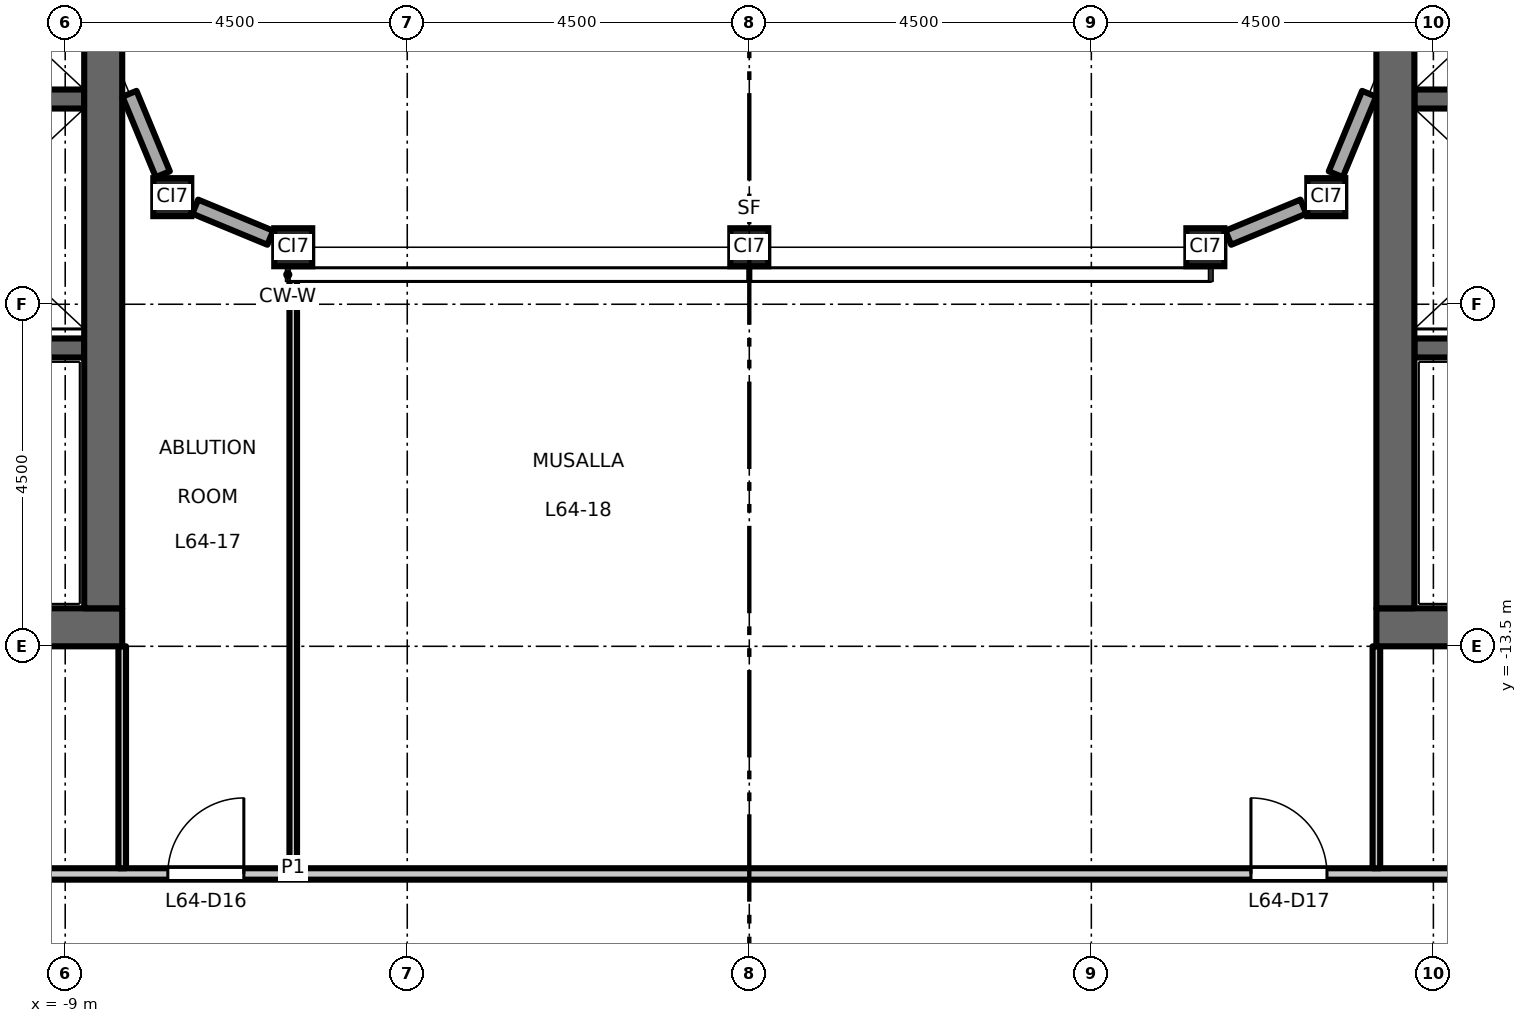
"""IFC4 building model, lengths in metres.
Left out: names, types, materials, properties, quantities, classifications, styles, units other than length and angle.
Written with IfcOpenShell. Run it as: python <this file> out.ifc"""

import sys

from ifc_helpers import new_model, si_unit, direction, frame, frame_2d, origin, origin_2d, place, context, subcontext, project, spatial, rectangle, hollow_rectangle, extrude, element, fill, save


model = new_model("IFC4")
c1 = context("Model", 3, precision=1e-05, world=origin(), true_north=direction((0.0, 1.0)))
c2 = subcontext(c1, "Body", "Model", "MODEL_VIEW")
j1 = project(units=[si_unit("LENGTHUNIT", "METRE"), si_unit("PLANEANGLEUNIT", "RADIAN")], contexts=[c1])
p1 = place(None, origin())
s1 = spatial("IfcSite", under=j1, at=p1, CompositionType="ELEMENT")
p2 = place(p1, origin())
s2 = spatial("IfcBuilding", under=s1, at=p2, CompositionType="ELEMENT")
p3 = place(p2, frame((0.0, 0.0, 298.7)))
s3 = spatial("IfcBuildingStorey", under=s2, at=p3, CompositionType="ELEMENT", Elevation=298.7)
for number, where, z_axis, x_axis in (
    (1, (-7.591, -7.591, 0.0), (0.0, 0.0, 1.0), (1.0, 0.0, 0.0)),
    (2, (-6.0, -8.25, 0.0), (0.0, 0.0, 1.0), (1.0, 0.0, 0.0)),
    (3, (0.0, -8.25, 0.0), (0.0, 0.0, 1.0), (1.0, 0.0, 0.0)),
    (4, (6.0, -8.25, 0.0), (0.0, 0.0, 1.0), (1.0, 0.0, 0.0)),
    (5, (7.591, -7.591, 0.0), (0.0, 0.0, 1.0), (1.0, 0.0, 0.0)),
):
    element("IfcColumn", number, at=place(p3, frame(where, z_axis=z_axis, x_axis=x_axis)), inside=s3, PredefinedType="COLUMN", context=c2, shape_type="SweptSolid", body=[
        extrude(hollow_rectangle(XDim=0.5, YDim=0.5, WallThickness=0.025, at=origin_2d()), origin(), (0.0, 0.0, 1.0), 4.5),
    ])
p4 = place(p3, frame((-8.75, -6.3, 0.0), z_axis=(0.0, 0.0, 1.0), x_axis=(-1.0, 0.0, 0.0)))
e6 = element("IfcWall", 6, at=p4, inside=s3, PredefinedType="SHEAR", context=c2, shape_type="SweptSolid", body=[
    extrude(rectangle(XDim=3.1, YDim=0.25, at=frame_2d((1.55, 0.0))), origin(), (0.0, 0.0, 1.0), 4.35),
])
p5 = place(p3, frame((-8.75, -9.575, 0.0), z_axis=(0.0, 0.0, 1.0), x_axis=(-1.0, 0.0, 0.0)))
e7 = element("IfcWall", 7, at=p5, inside=s3, PredefinedType="SHEAR", context=c2, shape_type="SweptSolid", body=[
    extrude(rectangle(XDim=8.0, YDim=0.25, at=frame_2d((4.0, 0.0))), origin(), (0.0, 0.0, 1.0), 4.35),
])
p6 = place(p5, frame((6.65, 0.0, 0.0)))
e8 = element("IfcOpeningElement", 8, at=p6, cuts=e7, PredefinedType="OPENING", context=c2, shape_type="SweptSolid", body=[
    extrude(rectangle(XDim=1.1, YDim=2.1, at=frame_2d((0.55, 1.05))), frame((0.0, 0.135, 0.0), z_axis=(0.0, -1.0, 0.0), x_axis=(1.0, 0.0, 0.0)), (0.0, 0.0, 1.0), 0.27),
])
p7 = place(p3, frame((-8.25, -13.25, 0.0), z_axis=(0.0, 0.0, 1.0), x_axis=(-1.0, 0.0, 0.0)))
e9 = element("IfcWall", 9, at=p7, inside=s3, PredefinedType="SHEAR", context=c2, shape_type="SweptSolid", body=[
    extrude(rectangle(XDim=9.0, YDim=0.5, at=frame_2d((4.5, 0.0))), origin(), (0.0, 0.0, 1.0), 4.35),
])
p8 = place(p3, frame((-8.5, -13.0, 0.0), z_axis=(0.0, 0.0, 1.0), x_axis=(0.0, 1.0, 0.0)))
e10 = element("IfcWall", 10, at=p8, inside=s3, PredefinedType="SHEAR", context=c2, shape_type="SweptSolid", body=[
    extrude(rectangle(XDim=26.0, YDim=0.5, at=frame_2d((13.0, 0.0))), origin(), (0.0, 0.0, 1.0), 4.35),
])
p9 = place(p3, frame((8.75, -6.3, 0.0), z_axis=(0.0, 0.0, 1.0), x_axis=(1.0, 0.0, 0.0)))
e11 = element("IfcWall", 11, at=p9, inside=s3, PredefinedType="SHEAR", context=c2, shape_type="SweptSolid", body=[
    extrude(rectangle(XDim=3.1, YDim=0.25, at=frame_2d((1.55, 0.0))), origin(), (0.0, 0.0, 1.0), 4.35),
])
p10 = place(p3, frame((8.75, -9.575, 0.0), z_axis=(0.0, 0.0, 1.0), x_axis=(1.0, 0.0, 0.0)))
e12 = element("IfcWall", 12, at=p10, inside=s3, PredefinedType="SHEAR", context=c2, shape_type="SweptSolid", body=[
    extrude(rectangle(XDim=8.0, YDim=0.25, at=frame_2d((4.0, 0.0))), origin(), (0.0, 0.0, 1.0), 4.35),
])
p11 = place(p10, frame((6.65, 0.0, 0.0)))
e13 = element("IfcOpeningElement", 13, at=p11, cuts=e12, PredefinedType="OPENING", context=c2, shape_type="SweptSolid", body=[
    extrude(rectangle(XDim=1.1, YDim=2.1, at=frame_2d((0.55, 1.05))), frame((0.0, 0.135, 0.0), z_axis=(0.0, -1.0, 0.0), x_axis=(1.0, 0.0, 0.0)), (0.0, 0.0, 1.0), 0.27),
])
p12 = place(p3, frame((8.25, -13.25, 0.0), z_axis=(0.0, 0.0, 1.0), x_axis=(1.0, 0.0, 0.0)))
e14 = element("IfcWall", 14, at=p12, inside=s3, PredefinedType="SHEAR", context=c2, shape_type="SweptSolid", body=[
    extrude(rectangle(XDim=9.0, YDim=0.5, at=frame_2d((4.5, 0.0))), origin(), (0.0, 0.0, 1.0), 4.35),
])
p13 = place(p3, frame((8.5, -13.0, 0.0), z_axis=(0.0, 0.0, 1.0), x_axis=(0.0, 1.0, 0.0)))
e15 = element("IfcWall", 15, at=p13, inside=s3, PredefinedType="SHEAR", context=c2, shape_type="SweptSolid", body=[
    extrude(rectangle(XDim=26.0, YDim=0.5, at=frame_2d((13.0, 0.0))), origin(), (0.0, 0.0, 1.0), 4.35),
])
p14 = place(p3, frame((6.302, -8.125, 0.0), z_axis=(0.0, 0.0, 1.0), x_axis=(0.923919409248, 0.382587147216, 0.0)))
e16 = element("IfcWall", 16, at=p14, inside=s3, PredefinedType="STANDARD", context=c2, shape_type="SweptSolid", body=[
    extrude(rectangle(XDim=1.069, YDim=0.2, at=frame_2d((0.534, 0.0))), origin(), (0.0, 0.0, 1.0), 4.01),
])
for number, where, z_axis, x_axis in (
    (17, (7.716, -7.289, 0.0), (0.0, 0.0, 1.0), (0.383, 0.924, 0.0)),
    (18, (-8.154, -6.231, 0.0), (0.0, 0.0, 1.0), (0.383, -0.924, 0.0)),
):
    element("IfcWall", number, at=place(p3, frame(where, z_axis=z_axis, x_axis=x_axis)), inside=s3, PredefinedType="STANDARD", context=c2, shape_type="SweptSolid", body=[
        extrude(rectangle(XDim=1.146, YDim=0.2, at=frame_2d((0.573, 0.0))), origin(), (0.0, 0.0, 1.0), 4.01),
    ])
p15 = place(p3, frame((-7.289, -7.716, 0.0), z_axis=(0.0, 0.0, 1.0), x_axis=(0.923919409248, -0.382587147216, 0.0)))
e19 = element("IfcWall", 19, at=p15, inside=s3, PredefinedType="STANDARD", context=c2, shape_type="SweptSolid", body=[
    extrude(rectangle(XDim=1.069, YDim=0.2, at=frame_2d((0.534, 0.0))), origin(), (0.0, 0.0, 1.0), 4.01),
])
p16 = place(p3, frame((-17.325, -16.495, 0.0), z_axis=(0.0, 0.0, 1.0), x_axis=(1.0, 0.0, 0.0)))
e20 = element("IfcWall", 20, at=p16, inside=s3, PredefinedType="PARTITIONING", context=c2, shape_type="SweptSolid", body=[
    extrude(rectangle(XDim=34.65, YDim=0.15, at=frame_2d((17.325, 0.0))), origin(), (0.0, 0.0, 1.0), 4.35),
])
p17 = place(p16, frame((9.675, 0.0, 0.0)))
e21 = element("IfcOpeningElement", 21, at=p17, cuts=e20, PredefinedType="OPENING", context=c2, shape_type="SweptSolid", body=[
    extrude(rectangle(XDim=1.0, YDim=2.1, at=frame_2d((0.5, 1.05))), frame((0.0, 0.085, 0.0), z_axis=(0.0, -1.0, 0.0), x_axis=(1.0, 0.0, 0.0)), (0.0, 0.0, 1.0), 0.17),
])
p18 = place(p16, frame((23.925, 0.0, 0.0)))
e22 = element("IfcOpeningElement", 22, at=p18, cuts=e20, PredefinedType="OPENING", context=c2, shape_type="SweptSolid", body=[
    extrude(rectangle(XDim=1.0, YDim=2.1, at=frame_2d((0.5, 1.05))), frame((0.0, 0.085, 0.0), z_axis=(0.0, -1.0, 0.0), x_axis=(1.0, 0.0, 0.0)), (0.0, 0.0, 1.0), 0.17),
])
p19 = place(p16, frame((0.675, 0.0, 0.0)))
e23 = element("IfcOpeningElement", 23, at=p19, cuts=e20, PredefinedType="OPENING", context=c2, shape_type="SweptSolid", body=[
    extrude(rectangle(XDim=1.0, YDim=2.1, at=frame_2d((0.5, 1.05))), frame((0.0, 0.085, 0.0), z_axis=(0.0, -1.0, 0.0), x_axis=(1.0, 0.0, 0.0)), (0.0, 0.0, 1.0), 0.17),
])
p20 = place(p16, frame((32.925, 0.0, 0.0)))
e24 = element("IfcOpeningElement", 24, at=p20, cuts=e20, PredefinedType="OPENING", context=c2, shape_type="SweptSolid", body=[
    extrude(rectangle(XDim=1.0, YDim=2.1, at=frame_2d((0.5, 1.05))), frame((0.0, 0.085, 0.0), z_axis=(0.0, -1.0, 0.0), x_axis=(1.0, 0.0, 0.0)), (0.0, 0.0, 1.0), 0.17),
])
p21 = place(p3, frame((-8.25, -16.42, 0.0), z_axis=(0.0, 0.0, 1.0), x_axis=(0.0, 1.0, 0.0)))
e25 = element("IfcWall", 25, at=p21, inside=s3, PredefinedType="PARTITIONING", context=c2, shape_type="SweptSolid", body=[
    extrude(rectangle(XDim=2.92, YDim=0.1, at=frame_2d((1.46, 0.0))), origin(), (0.0, 0.0, 1.0), 4.35),
])
p22 = place(p3, frame((-6.0, -16.42, 0.0), z_axis=(0.0, 0.0, 1.0), x_axis=(0.0, 1.0, 0.0)))
e26 = element("IfcWall", 26, at=p22, inside=s3, PredefinedType="PARTITIONING", context=c2, shape_type="SweptSolid", body=[
    extrude(rectangle(XDim=7.87, YDim=0.1, at=frame_2d((3.935, 0.0))), origin(), (0.0, 0.0, 1.0), 4.35),
])
p23 = place(p3, frame((8.25, -16.42, 0.0), z_axis=(0.0, 0.0, 1.0), x_axis=(0.0, 1.0, 0.0)))
e27 = element("IfcWall", 27, at=p23, inside=s3, PredefinedType="PARTITIONING", context=c2, shape_type="SweptSolid", body=[
    extrude(rectangle(XDim=2.92, YDim=0.1, at=frame_2d((1.46, 0.0))), origin(), (0.0, 0.0, 1.0), 4.35),
])
p24 = place(p17, origin())
e28 = element("IfcDoor", 28, at=p24, inside=s3, OperationType="SINGLE_SWING_RIGHT", PredefinedType="DOOR", context=c2, shape_type="SweptSolid", body=[
    extrude(rectangle(XDim=1.0, YDim=2.1, at=frame_2d((0.5, 1.05))), frame((0.0, 0.025, 0.0), z_axis=(0.0, -1.0, 0.0), x_axis=(1.0, 0.0, 0.0)), (0.0, 0.0, 1.0), 0.05),
])
fill(e21, e28)
p25 = place(p18, origin())
e29 = element("IfcDoor", 29, at=p25, inside=s3, OperationType="SINGLE_SWING_LEFT", PredefinedType="DOOR", context=c2, shape_type="SweptSolid", body=[
    extrude(rectangle(XDim=1.0, YDim=2.1, at=frame_2d((0.5, 1.05))), frame((0.0, 0.025, 0.0), z_axis=(0.0, -1.0, 0.0), x_axis=(1.0, 0.0, 0.0)), (0.0, 0.0, 1.0), 0.05),
])
fill(e22, e29)
save(model, sys.argv[1])
